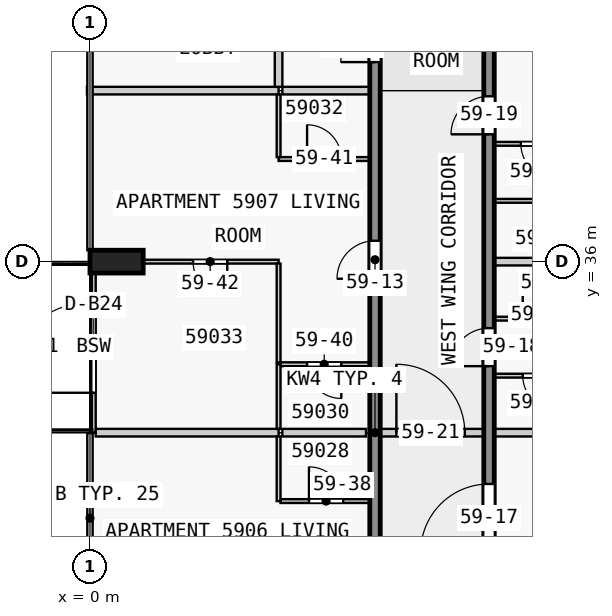
"""IFC4 building model, lengths in metres.
Left out: names, types, materials, properties, quantities, classifications, styles, units other than length and angle.
Written with IfcOpenShell. Run it as: python <this file> out.ifc"""

import sys

from ifc_helpers import new_model, si_unit, direction, frame, frame_2d, origin, origin_2d, place, context, subcontext, project, spatial, rectangle, extrude, element, fill, save


model = new_model("IFC4")
c1 = context("Model", 3, precision=1e-05, world=origin(), true_north=direction((0.0, 1.0)))
c2 = subcontext(c1, "Body", "Model", "MODEL_VIEW")
j1 = project(units=[si_unit("LENGTHUNIT", "METRE"), si_unit("PLANEANGLEUNIT", "RADIAN")], contexts=[c1])
p1 = place(None, origin())
s1 = spatial("IfcSite", under=j1, at=p1, CompositionType="ELEMENT")
p2 = place(p1, origin())
s2 = spatial("IfcBuilding", under=s1, at=p2, CompositionType="ELEMENT")
p3 = place(p2, frame((0.0, 0.0, 225.9)))
s3 = spatial("IfcBuildingStorey", under=s2, at=p3, CompositionType="ELEMENT", Elevation=225.9)
p4 = place(p3, frame((0.7, 36.0, 0.0), z_axis=(0.0, 0.0, 1.0), x_axis=(0.0, 1.0, 0.0)))
e1 = element("IfcColumn", 1, at=p4, inside=s3, PredefinedType="COLUMN", context=c2, shape_type="SweptSolid", body=[
    extrude(rectangle(XDim=0.6, YDim=1.4, at=origin_2d()), origin(), (0.0, 0.0, 1.0), 3.5),
])
p5 = place(p3, frame((7.5, 18.0, 0.0), z_axis=(0.0, 0.0, 1.0), x_axis=(0.0, 1.0, 0.0)))
e2 = element("IfcWall", 2, at=p5, inside=s3, PredefinedType="SHEAR", context=c2, shape_type="SweptSolid", body=[
    extrude(rectangle(XDim=27.0, YDim=0.275, at=frame_2d((13.5, 0.0))), origin(), (0.0, 0.0, 1.0), 3.05),
])
p6 = place(p5, frame((1.75, 0.0, 0.0)))
e3 = element("IfcOpeningElement", 3, at=p6, cuts=e2, PredefinedType="OPENING", context=c2, shape_type="SweptSolid", body=[
    extrude(rectangle(XDim=1.0, YDim=2.1, at=frame_2d((0.5, 1.05))), frame((0.0, 0.147, 0.0), z_axis=(0.0, -1.0, 0.0), x_axis=(1.0, 0.0, 0.0)), (0.0, 0.0, 1.0), 0.295),
])
p7 = place(p5, frame((8.55, 0.0, 0.0)))
e4 = element("IfcOpeningElement", 4, at=p7, cuts=e2, PredefinedType="OPENING", context=c2, shape_type="SweptSolid", body=[
    extrude(rectangle(XDim=1.0, YDim=2.1, at=frame_2d((0.5, 1.05))), frame((0.0, 0.147, 0.0), z_axis=(0.0, -1.0, 0.0), x_axis=(1.0, 0.0, 0.0)), (0.0, 0.0, 1.0), 0.295),
])
p8 = place(p5, frame((17.55, 0.0, 0.0)))
e5 = element("IfcOpeningElement", 5, at=p8, cuts=e2, PredefinedType="OPENING", context=c2, shape_type="SweptSolid", body=[
    extrude(rectangle(XDim=1.0, YDim=2.1, at=frame_2d((0.5, 1.05))), frame((0.0, 0.147, 0.0), z_axis=(0.0, -1.0, 0.0), x_axis=(1.0, 0.0, 0.0)), (0.0, 0.0, 1.0), 0.295),
])
p9 = place(p5, frame((23.25, 0.0, 0.0)))
e6 = element("IfcOpeningElement", 6, at=p9, cuts=e2, PredefinedType="OPENING", context=c2, shape_type="SweptSolid", body=[
    extrude(rectangle(XDim=0.9, YDim=2.1, at=frame_2d((0.45, 1.05))), frame((0.0, 0.147, 0.0), z_axis=(0.0, -1.0, 0.0), x_axis=(1.0, 0.0, 0.0)), (0.0, 0.0, 1.0), 0.295),
])
p10 = place(p5, frame((25.45, 0.0, 0.0)))
e7 = element("IfcOpeningElement", 7, at=p10, cuts=e2, PredefinedType="OPENING", context=c2, shape_type="SweptSolid", body=[
    extrude(rectangle(XDim=1.0, YDim=2.1, at=frame_2d((0.5, 1.05))), frame((0.0, 0.147, 0.0), z_axis=(0.0, -1.0, 0.0), x_axis=(1.0, 0.0, 0.0)), (0.0, 0.0, 1.0), 0.295),
])
p11 = place(p3, frame((10.5, 18.0, 0.0), z_axis=(0.0, 0.0, 1.0), x_axis=(0.0, 1.0, 0.0)))
e8 = element("IfcWall", 8, at=p11, inside=s3, PredefinedType="SHEAR", context=c2, shape_type="SweptSolid", body=[
    extrude(rectangle(XDim=27.0, YDim=0.275, at=frame_2d((13.5, 0.0))), origin(), (0.0, 0.0, 1.0), 3.05),
])
p12 = place(p11, frame((4.05, 0.0, 0.0)))
e9 = element("IfcOpeningElement", 9, at=p12, cuts=e8, PredefinedType="OPENING", context=c2, shape_type="SweptSolid", body=[
    extrude(rectangle(XDim=1.0, YDim=2.1, at=frame_2d((0.5, 1.05))), frame((0.0, 0.147, 0.0), z_axis=(0.0, -1.0, 0.0), x_axis=(1.0, 0.0, 0.0)), (0.0, 0.0, 1.0), 0.295),
])
p13 = place(p11, frame((10.35, 0.0, 0.0)))
e10 = element("IfcOpeningElement", 10, at=p13, cuts=e8, PredefinedType="OPENING", context=c2, shape_type="SweptSolid", body=[
    extrude(rectangle(XDim=1.8, YDim=2.1, at=frame_2d((0.9, 1.05))), frame((0.0, 0.147, 0.0), z_axis=(0.0, -1.0, 0.0), x_axis=(1.0, 0.0, 0.0)), (0.0, 0.0, 1.0), 0.295),
])
p14 = place(p11, frame((15.25, 0.0, 0.0)))
e11 = element("IfcOpeningElement", 11, at=p14, cuts=e8, PredefinedType="OPENING", context=c2, shape_type="SweptSolid", body=[
    extrude(rectangle(XDim=1.0, YDim=2.1, at=frame_2d((0.5, 1.05))), frame((0.0, 0.147, 0.0), z_axis=(0.0, -1.0, 0.0), x_axis=(1.0, 0.0, 0.0)), (0.0, 0.0, 1.0), 0.295),
])
p15 = place(p11, frame((21.35, 0.0, 0.0)))
e12 = element("IfcOpeningElement", 12, at=p15, cuts=e8, PredefinedType="OPENING", context=c2, shape_type="SweptSolid", body=[
    extrude(rectangle(XDim=1.0, YDim=2.1, at=frame_2d((0.5, 1.05))), frame((0.0, 0.147, 0.0), z_axis=(0.0, -1.0, 0.0), x_axis=(1.0, 0.0, 0.0)), (0.0, 0.0, 1.0), 0.295),
])
p16 = place(p3, frame((0.1, 31.5, 0.0), z_axis=(0.0, 0.0, 1.0), x_axis=(0.0, 1.0, 0.0)))
e13 = element("IfcWall", 13, at=p16, inside=s3, PredefinedType="STANDARD", context=c2, shape_type="SweptSolid", body=[
    extrude(rectangle(XDim=4.5, YDim=0.1, at=frame_2d((2.25, 0.0))), origin(), (0.0, 0.0, 1.0), 3.05),
])
p17 = place(p16, frame((1.05, 0.0, 0.0)))
e14 = element("IfcOpeningElement", 14, at=p17, cuts=e13, PredefinedType="OPENING", context=c2, shape_type="SweptSolid", body=[
    extrude(rectangle(XDim=2.4, YDim=2.4, at=frame_2d((1.2, 1.2))), frame((0.0, 0.06, 0.0), z_axis=(0.0, -1.0, 0.0), x_axis=(1.0, 0.0, 0.0)), (0.0, 0.0, 1.0), 0.12),
])
p18 = place(p3, frame((5.012, 29.7, 0.0), z_axis=(0.0, 0.0, 1.0), x_axis=(1.0, 0.0, 0.0)))
e15 = element("IfcWall", 15, at=p18, inside=s3, PredefinedType="PARTITIONING", context=c2, shape_type="SweptSolid", body=[
    extrude(rectangle(XDim=2.35, YDim=0.1, at=frame_2d((1.175, 0.0))), origin(), (0.0, 0.0, 1.0), 3.05),
])
p19 = place(p18, frame((0.75, 0.0, 0.0)))
e16 = element("IfcOpeningElement", 16, at=p19, cuts=e15, PredefinedType="OPENING", context=c2, shape_type="SweptSolid", body=[
    extrude(rectangle(XDim=0.9, YDim=2.1, at=frame_2d((0.45, 1.05))), frame((0.0, 0.06, 0.0), z_axis=(0.0, -1.0, 0.0), x_axis=(1.0, 0.0, 0.0)), (0.0, 0.0, 1.0), 0.12),
])
p20 = place(p3, frame((7.262, 31.5, 0.0), z_axis=(0.0, 0.0, 1.0), x_axis=(-1.0, 0.0, 0.0)))
e17 = element("IfcWall", 17, at=p20, inside=s3, PredefinedType="PARTITIONING", context=c2, shape_type="SweptSolid", body=[
    extrude(rectangle(XDim=2.2, YDim=0.2, at=frame_2d((1.1, 0.0))), origin(), (0.0, 0.0, 1.0), 3.05),
])
p21 = place(p3, frame((17.85, 31.5, 0.0), z_axis=(0.0, 0.0, 1.0), x_axis=(-1.0, 0.0, 0.0)))
e18 = element("IfcWall", 18, at=p21, inside=s3, PredefinedType="PARTITIONING", context=c2, shape_type="SweptSolid", body=[
    extrude(rectangle(XDim=7.213, YDim=0.2, at=frame_2d((3.606, 0.0))), origin(), (0.0, 0.0, 1.0), 3.05),
])
p22 = place(p3, frame((0.15, 31.5, 0.0), z_axis=(0.0, 0.0, 1.0), x_axis=(1.0, 0.0, 0.0)))
e19 = element("IfcWall", 19, at=p22, inside=s3, PredefinedType="PARTITIONING", context=c2, shape_type="SweptSolid", body=[
    extrude(rectangle(XDim=4.812, YDim=0.2, at=frame_2d((2.406, 0.0))), origin(), (0.0, 0.0, 1.0), 3.05),
])
p23 = place(p3, frame((13.038, 33.0, 0.0), z_axis=(0.0, 0.0, 1.0), x_axis=(-1.0, 0.0, 0.0)))
e20 = element("IfcWall", 20, at=p23, inside=s3, PredefinedType="PARTITIONING", context=c2, shape_type="SweptSolid", body=[
    extrude(rectangle(XDim=2.4, YDim=0.1, at=frame_2d((1.2, 0.0))), origin(), (0.0, 0.0, 1.0), 3.05),
])
p24 = place(p23, frame((0.75, 0.0, 0.0)))
e21 = element("IfcOpeningElement", 21, at=p24, cuts=e20, PredefinedType="OPENING", context=c2, shape_type="SweptSolid", body=[
    extrude(rectangle(XDim=0.9, YDim=2.1, at=frame_2d((0.45, 1.05))), frame((0.0, 0.06, 0.0), z_axis=(0.0, -1.0, 0.0), x_axis=(1.0, 0.0, 0.0)), (0.0, 0.0, 1.0), 0.12),
])
p25 = place(p3, frame((7.363, 33.3, 0.0), z_axis=(0.0, 0.0, 1.0), x_axis=(-1.0, 0.0, 0.0)))
e22 = element("IfcWall", 22, at=p25, inside=s3, PredefinedType="PARTITIONING", context=c2, shape_type="SweptSolid", body=[
    extrude(rectangle(XDim=2.35, YDim=0.1, at=frame_2d((1.175, 0.0))), origin(), (0.0, 0.0, 1.0), 3.05),
])
p26 = place(p25, frame((0.75, 0.0, 0.0)))
e23 = element("IfcOpeningElement", 23, at=p26, cuts=e22, PredefinedType="OPENING", context=c2, shape_type="SweptSolid", body=[
    extrude(rectangle(XDim=0.9, YDim=2.1, at=frame_2d((0.45, 1.05))), frame((0.0, 0.06, 0.0), z_axis=(0.0, -1.0, 0.0), x_axis=(1.0, 0.0, 0.0)), (0.0, 0.0, 1.0), 0.12),
])
p27 = place(p3, frame((10.637, 34.5, 0.0), z_axis=(0.0, 0.0, 1.0), x_axis=(1.0, 0.0, 0.0)))
e24 = element("IfcWall", 24, at=p27, inside=s3, PredefinedType="PARTITIONING", context=c2, shape_type="SweptSolid", body=[
    extrude(rectangle(XDim=2.35, YDim=0.1, at=frame_2d((1.175, 0.0))), origin(), (0.0, 0.0, 1.0), 3.05),
])
p28 = place(p27, frame((0.75, 0.0, 0.0)))
e25 = element("IfcOpeningElement", 25, at=p28, cuts=e24, PredefinedType="OPENING", context=c2, shape_type="SweptSolid", body=[
    extrude(rectangle(XDim=0.9, YDim=2.1, at=frame_2d((0.45, 1.05))), frame((0.0, 0.06, 0.0), z_axis=(0.0, -1.0, 0.0), x_axis=(1.0, 0.0, 0.0)), (0.0, 0.0, 1.0), 0.12),
])
p29 = place(p3, frame((4.962, 36.0, 0.0), z_axis=(0.0, 0.0, 1.0), x_axis=(-1.0, 0.0, 0.0)))
e26 = element("IfcWall", 26, at=p29, inside=s3, PredefinedType="PARTITIONING", context=c2, shape_type="SweptSolid", body=[
    extrude(rectangle(XDim=3.562, YDim=0.1, at=frame_2d((1.781, 0.0))), origin(), (0.0, 0.0, 1.0), 3.05),
])
p30 = place(p29, frame((1.35, 0.0, 0.0)))
e27 = element("IfcOpeningElement", 27, at=p30, cuts=e26, PredefinedType="OPENING", context=c2, shape_type="SweptSolid", body=[
    extrude(rectangle(XDim=0.9, YDim=2.1, at=frame_2d((0.45, 1.05))), frame((0.0, 0.06, 0.0), z_axis=(0.0, -1.0, 0.0), x_axis=(1.0, 0.0, 0.0)), (0.0, 0.0, 1.0), 0.12),
])
p31 = place(p3, frame((12.938, 36.0, 0.0), z_axis=(0.0, 0.0, 1.0), x_axis=(-1.0, 0.0, 0.0)))
e28 = element("IfcWall", 28, at=p31, inside=s3, PredefinedType="PARTITIONING", context=c2, shape_type="SweptSolid", body=[
    extrude(rectangle(XDim=2.3, YDim=0.2, at=frame_2d((1.15, 0.0))), origin(), (0.0, 0.0, 1.0), 3.05),
])
p32 = place(p3, frame((12.988, 37.6, 0.0), z_axis=(0.0, 0.0, 1.0), x_axis=(-1.0, 0.0, 0.0)))
e29 = element("IfcWall", 29, at=p32, inside=s3, PredefinedType="PARTITIONING", context=c2, shape_type="SweptSolid", body=[
    extrude(rectangle(XDim=2.35, YDim=0.1, at=frame_2d((1.175, 0.0))), origin(), (0.0, 0.0, 1.0), 3.05),
])
p33 = place(p3, frame((4.962, 38.7, 0.0), z_axis=(0.0, 0.0, 1.0), x_axis=(1.0, 0.0, 0.0)))
e30 = element("IfcWall", 30, at=p33, inside=s3, PredefinedType="PARTITIONING", context=c2, shape_type="SweptSolid", body=[
    extrude(rectangle(XDim=2.4, YDim=0.1, at=frame_2d((1.2, 0.0))), origin(), (0.0, 0.0, 1.0), 3.05),
])
p34 = place(p33, frame((0.75, 0.0, 0.0)))
e31 = element("IfcOpeningElement", 31, at=p34, cuts=e30, PredefinedType="OPENING", context=c2, shape_type="SweptSolid", body=[
    extrude(rectangle(XDim=0.9, YDim=2.1, at=frame_2d((0.45, 1.05))), frame((0.0, 0.06, 0.0), z_axis=(0.0, -1.0, 0.0), x_axis=(1.0, 0.0, 0.0)), (0.0, 0.0, 1.0), 0.12),
])
p35 = place(p3, frame((12.988, 39.1, 0.0), z_axis=(0.0, 0.0, 1.0), x_axis=(-1.0, 0.0, 0.0)))
e32 = element("IfcWall", 32, at=p35, inside=s3, PredefinedType="PARTITIONING", context=c2, shape_type="SweptSolid", body=[
    extrude(rectangle(XDim=2.35, YDim=0.1, at=frame_2d((1.175, 0.0))), origin(), (0.0, 0.0, 1.0), 3.05),
])
p36 = place(p35, frame((0.75, 0.0, 0.0)))
e33 = element("IfcOpeningElement", 33, at=p36, cuts=e32, PredefinedType="OPENING", context=c2, shape_type="SweptSolid", body=[
    extrude(rectangle(XDim=0.9, YDim=2.1, at=frame_2d((0.45, 1.05))), frame((0.0, 0.06, 0.0), z_axis=(0.0, -1.0, 0.0), x_axis=(1.0, 0.0, 0.0)), (0.0, 0.0, 1.0), 0.12),
])
p37 = place(p3, frame((7.363, 40.5, 0.0), z_axis=(0.0, 0.0, 1.0), x_axis=(-1.0, 0.0, 0.0)))
e34 = element("IfcWall", 34, at=p37, inside=s3, PredefinedType="PARTITIONING", context=c2, shape_type="SweptSolid", body=[
    extrude(rectangle(XDim=2.3, YDim=0.2, at=frame_2d((1.15, 0.0))), origin(), (0.0, 0.0, 1.0), 3.05),
])
p38 = place(p3, frame((-0.08, 40.5, 0.0), z_axis=(0.0, 0.0, 1.0), x_axis=(1.0, 0.0, 0.0)))
e35 = element("IfcWall", 35, at=p38, inside=s3, PredefinedType="PARTITIONING", context=c2, shape_type="SweptSolid", body=[
    extrude(rectangle(XDim=5.042, YDim=0.2, at=frame_2d((2.521, 0.0))), origin(), (0.0, 0.0, 1.0), 3.05),
])
for number, where, z_axis, x_axis in (
    (36, (4.962, 31.4, 0.0), (0.0, 0.0, 1.0), (0.0, -1.0, 0.0)),
    (37, (4.962, 33.3, 0.0), (0.0, 0.0, 1.0), (0.0, -1.0, 0.0)),
):
    element("IfcWall", number, at=place(p3, frame(where, z_axis=z_axis, x_axis=x_axis)), inside=s3, PredefinedType="PARTITIONING", context=c2, shape_type="SweptSolid", body=[
        extrude(rectangle(XDim=1.7, YDim=0.1, at=frame_2d((0.85, 0.0))), origin(), (0.0, 0.0, 1.0), 3.05),
    ])
p39 = place(p3, frame((4.962, 40.4, 0.0), z_axis=(0.0, 0.0, 1.0), x_axis=(0.0, -1.0, 0.0)))
e38 = element("IfcWall", 38, at=p39, inside=s3, PredefinedType="PARTITIONING", context=c2, shape_type="SweptSolid", body=[
    extrude(rectangle(XDim=1.65, YDim=0.1, at=frame_2d((0.825, 0.0))), origin(), (0.0, 0.0, 1.0), 3.05),
])
p40 = place(p3, frame((4.962, 33.35, 0.0), z_axis=(0.0, 0.0, 1.0), x_axis=(0.0, 1.0, 0.0)))
e39 = element("IfcWall", 39, at=p40, inside=s3, PredefinedType="PARTITIONING", context=c2, shape_type="SweptSolid", body=[
    extrude(rectangle(XDim=2.6, YDim=0.1, at=frame_2d((1.3, 0.0))), origin(), (0.0, 0.0, 1.0), 3.05),
])
p41 = place(p3, frame((4.962, 42.8, 0.0), z_axis=(0.0, 0.0, 1.0), x_axis=(0.0, -1.0, 0.0)))
e40 = element("IfcWall", 40, at=p41, inside=s3, PredefinedType="PARTITIONING", context=c2, shape_type="SweptSolid", body=[
    extrude(rectangle(XDim=2.2, YDim=0.2, at=frame_2d((1.1, 0.0))), origin(), (0.0, 0.0, 1.0), 3.05),
])
p42 = place(p3, frame((7.363, 31.5, 0.0), z_axis=(0.0, 0.0, 1.0), x_axis=(1.0, 0.0, 0.0)))
e41 = element("IfcWall", 41, at=p42, inside=s3, PredefinedType="PARTITIONING", context=c2, shape_type="SweptSolid", body=[
    extrude(rectangle(XDim=3.175, YDim=0.2, at=frame_2d((1.587, 0.0))), origin(), (0.0, 0.0, 1.0), 3.05),
])
p43 = place(p42, frame((0.7, 0.0, 0.0)))
e42 = element("IfcOpeningElement", 42, at=p43, cuts=e41, PredefinedType="OPENING", context=c2, shape_type="SweptSolid", body=[
    extrude(rectangle(XDim=1.8, YDim=2.1, at=frame_2d((0.9, 1.05))), frame((0.0, 0.11, 0.0), z_axis=(0.0, -1.0, 0.0), x_axis=(1.0, 0.0, 0.0)), (0.0, 0.0, 1.0), 0.22),
])
p44 = place(p17, origin())
e43 = element("IfcDoor", 43, at=p44, inside=s3, OperationType="SINGLE_SWING_LEFT", PredefinedType="DOOR", context=c2, shape_type="SweptSolid", body=[
    extrude(rectangle(XDim=2.4, YDim=2.4, at=frame_2d((1.2, 1.2))), frame((0.0, 0.025, 0.0), z_axis=(0.0, -1.0, 0.0), x_axis=(1.0, 0.0, 0.0)), (0.0, 0.0, 1.0), 0.05),
])
fill(e14, e43)
p45 = place(p8, origin())
e44 = element("IfcDoor", 44, at=p45, inside=s3, OperationType="SINGLE_SWING_RIGHT", PredefinedType="DOOR", context=c2, shape_type="SweptSolid", body=[
    extrude(rectangle(XDim=1.0, YDim=2.1, at=frame_2d((0.5, 1.05))), frame((0.0, 0.025, 0.0), z_axis=(0.0, -1.0, 0.0), x_axis=(1.0, 0.0, 0.0)), (0.0, 0.0, 1.0), 0.05),
])
fill(e5, e44)
p46 = place(p9, origin())
e45 = element("IfcDoor", 45, at=p46, inside=s3, OperationType="SINGLE_SWING_RIGHT", PredefinedType="DOOR", context=c2, shape_type="SweptSolid", body=[
    extrude(rectangle(XDim=0.9, YDim=2.1, at=frame_2d((0.45, 1.05))), frame((0.0, 0.025, 0.0), z_axis=(0.0, -1.0, 0.0), x_axis=(1.0, 0.0, 0.0)), (0.0, 0.0, 1.0), 0.05),
])
fill(e6, e45)
p47 = place(p13, origin())
e46 = element("IfcDoor", 46, at=p47, inside=s3, OperationType="SINGLE_SWING_LEFT", PredefinedType="DOOR", context=c2, shape_type="SweptSolid", body=[
    extrude(rectangle(XDim=1.8, YDim=2.1, at=frame_2d((0.9, 1.05))), frame((0.0, 0.025, 0.0), z_axis=(0.0, -1.0, 0.0), x_axis=(1.0, 0.0, 0.0)), (0.0, 0.0, 1.0), 0.05),
])
fill(e10, e46)
p48 = place(p14, origin())
e47 = element("IfcDoor", 47, at=p48, inside=s3, OperationType="SINGLE_SWING_RIGHT", PredefinedType="DOOR", context=c2, shape_type="SweptSolid", body=[
    extrude(rectangle(XDim=1.0, YDim=2.1, at=frame_2d((0.5, 1.05))), frame((0.0, 0.025, 0.0), z_axis=(0.0, -1.0, 0.0), x_axis=(1.0, 0.0, 0.0)), (0.0, 0.0, 1.0), 0.05),
])
fill(e11, e47)
p49 = place(p15, origin())
e48 = element("IfcDoor", 48, at=p49, inside=s3, OperationType="SINGLE_SWING_RIGHT", PredefinedType="DOOR", context=c2, shape_type="SweptSolid", body=[
    extrude(rectangle(XDim=1.0, YDim=2.1, at=frame_2d((0.5, 1.05))), frame((0.0, 0.025, 0.0), z_axis=(0.0, -1.0, 0.0), x_axis=(1.0, 0.0, 0.0)), (0.0, 0.0, 1.0), 0.05),
])
fill(e12, e48)
p50 = place(p43, origin())
e49 = element("IfcDoor", 49, at=p50, inside=s3, OperationType="SINGLE_SWING_RIGHT", PredefinedType="DOOR", context=c2, shape_type="SweptSolid", body=[
    extrude(rectangle(XDim=1.8, YDim=2.1, at=frame_2d((0.9, 1.05))), frame((0.0, 0.025, 0.0), z_axis=(0.0, -1.0, 0.0), x_axis=(1.0, 0.0, 0.0)), (0.0, 0.0, 1.0), 0.05),
])
fill(e42, e49)
p51 = place(p19, origin())
e50 = element("IfcDoor", 50, at=p51, inside=s3, OperationType="SINGLE_SWING_RIGHT", PredefinedType="DOOR", context=c2, shape_type="SweptSolid", body=[
    extrude(rectangle(XDim=0.9, YDim=2.1, at=frame_2d((0.45, 1.05))), frame((0.0, 0.025, 0.0), z_axis=(0.0, -1.0, 0.0), x_axis=(1.0, 0.0, 0.0)), (0.0, 0.0, 1.0), 0.05),
])
fill(e16, e50)
p52 = place(p26, origin())
e51 = element("IfcDoor", 51, at=p52, inside=s3, OperationType="SINGLE_SWING_RIGHT", PredefinedType="DOOR", context=c2, shape_type="SweptSolid", body=[
    extrude(rectangle(XDim=0.9, YDim=2.1, at=frame_2d((0.45, 1.05))), frame((0.0, 0.025, 0.0), z_axis=(0.0, -1.0, 0.0), x_axis=(1.0, 0.0, 0.0)), (0.0, 0.0, 1.0), 0.05),
])
fill(e23, e51)
p53 = place(p34, origin())
e52 = element("IfcDoor", 52, at=p53, inside=s3, OperationType="SINGLE_SWING_RIGHT", PredefinedType="DOOR", context=c2, shape_type="SweptSolid", body=[
    extrude(rectangle(XDim=0.9, YDim=2.1, at=frame_2d((0.45, 1.05))), frame((0.0, 0.025, 0.0), z_axis=(0.0, -1.0, 0.0), x_axis=(1.0, 0.0, 0.0)), (0.0, 0.0, 1.0), 0.05),
])
fill(e31, e52)
p54 = place(p30, origin())
e53 = element("IfcDoor", 53, at=p54, inside=s3, OperationType="SINGLE_SWING_RIGHT", PredefinedType="DOOR", context=c2, shape_type="SweptSolid", body=[
    extrude(rectangle(XDim=0.9, YDim=2.1, at=frame_2d((0.45, 1.05))), frame((0.0, 0.025, 0.0), z_axis=(0.0, -1.0, 0.0), x_axis=(1.0, 0.0, 0.0)), (0.0, 0.0, 1.0), 0.05),
])
fill(e27, e53)
p55 = place(p24, origin())
e54 = element("IfcDoor", 54, at=p55, inside=s3, OperationType="SINGLE_SWING_LEFT", PredefinedType="DOOR", context=c2, shape_type="SweptSolid", body=[
    extrude(rectangle(XDim=0.9, YDim=2.1, at=frame_2d((0.45, 1.05))), frame((0.0, 0.025, 0.0), z_axis=(0.0, -1.0, 0.0), x_axis=(1.0, 0.0, 0.0)), (0.0, 0.0, 1.0), 0.05),
])
fill(e21, e54)
p56 = place(p28, origin())
e55 = element("IfcDoor", 55, at=p56, inside=s3, OperationType="SINGLE_SWING_RIGHT", PredefinedType="DOOR", context=c2, shape_type="SweptSolid", body=[
    extrude(rectangle(XDim=0.9, YDim=2.1, at=frame_2d((0.45, 1.05))), frame((0.0, 0.025, 0.0), z_axis=(0.0, -1.0, 0.0), x_axis=(1.0, 0.0, 0.0)), (0.0, 0.0, 1.0), 0.05),
])
fill(e25, e55)
p57 = place(p36, origin())
e56 = element("IfcDoor", 56, at=p57, inside=s3, OperationType="SINGLE_SWING_RIGHT", PredefinedType="DOOR", context=c2, shape_type="SweptSolid", body=[
    extrude(rectangle(XDim=0.9, YDim=2.1, at=frame_2d((0.45, 1.05))), frame((0.0, 0.025, 0.0), z_axis=(0.0, -1.0, 0.0), x_axis=(1.0, 0.0, 0.0)), (0.0, 0.0, 1.0), 0.05),
])
fill(e33, e56)
save(model, sys.argv[1])
